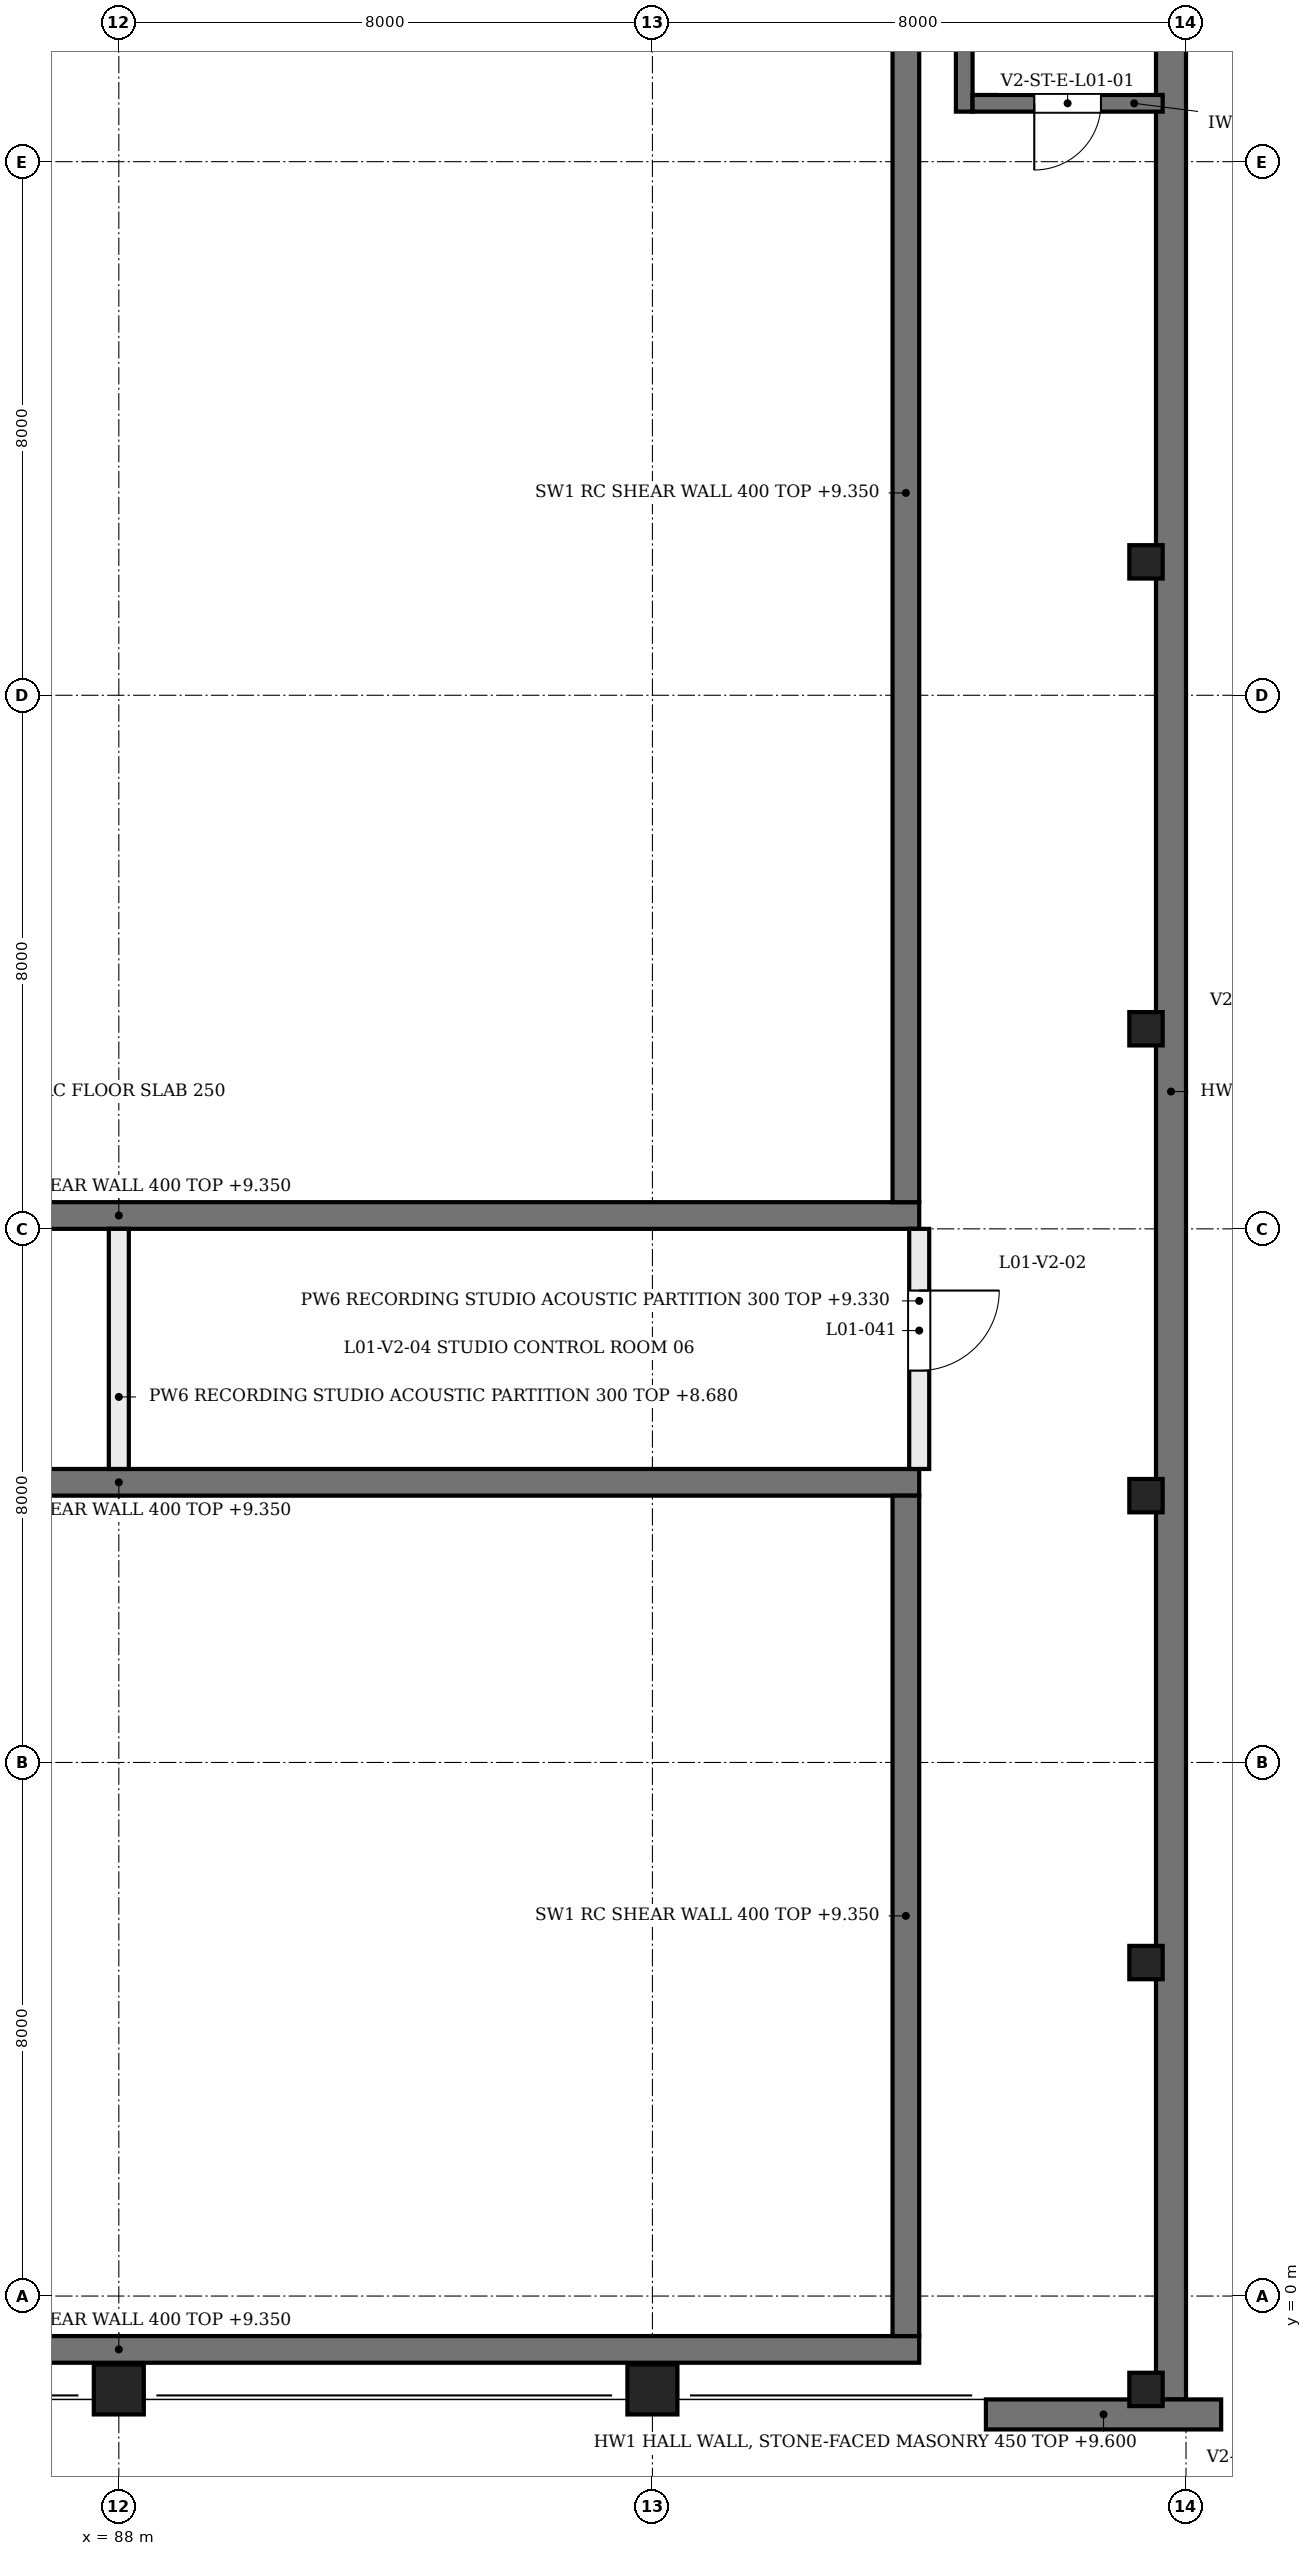
"""IFC4 building model, lengths in metres.
Left out: names, types, materials, properties, quantities, classifications, styles, units other than length and angle.
Written with IfcOpenShell. Run it as: python <this file> out.ifc"""

import sys

from ifc_helpers import new_model, si_unit, direction, frame, frame_2d, origin, origin_2d, place, context, subcontext, project, spatial, rectangle, hollow_rectangle, extrude, element, fill, save


model = new_model("IFC4")
c1 = context("Model", 3, precision=1e-05, world=origin(), true_north=direction((0.0, 1.0)))
c2 = subcontext(c1, "Body", "Model", "MODEL_VIEW")
j1 = project(units=[si_unit("LENGTHUNIT", "METRE"), si_unit("PLANEANGLEUNIT", "RADIAN")], contexts=[c1])
p1 = place(None, origin())
s1 = spatial("IfcSite", under=j1, at=p1, CompositionType="ELEMENT")
p2 = place(p1, origin())
s2 = spatial("IfcBuilding", under=s1, at=p2, CompositionType="ELEMENT")
p3 = place(p2, frame((0.0, 0.0, 4.8)))
s3 = spatial("IfcBuildingStorey", under=s2, at=p3, CompositionType="ELEMENT", Elevation=4.8)
p4 = place(p3, frame((76.0, 16.2, 0.0), z_axis=(0.0, 0.0, 1.0), x_axis=(1.0, 0.0, 0.0)))
e1 = element("IfcWall", 1, at=p4, inside=s3, PredefinedType="SHEAR", context=c2, shape_type="SweptSolid", body=[
    extrude(rectangle(XDim=24.0, YDim=0.4, at=frame_2d((12.0, 0.0))), origin(), (0.0, 0.0, 1.0), 4.55),
])
p5 = place(p3, frame((99.8, 16.4, 0.0), z_axis=(0.0, 0.0, 1.0), x_axis=(0.0, 1.0, 0.0)))
e2 = element("IfcWall", 2, at=p5, inside=s3, PredefinedType="SHEAR", context=c2, shape_type="SweptSolid", body=[
    extrude(rectangle(XDim=22.6, YDim=0.4, at=frame_2d((11.3, 0.0))), origin(), (0.0, 0.0, 1.0), 4.55),
])
for number, where, z_axis, x_axis in (
    (3, (76.0, -0.8, 0.0), (0.0, 0.0, 1.0), (1.0, 0.0, 0.0)),
    (4, (76.0, 12.2, 0.0), (0.0, 0.0, 1.0), (1.0, 0.0, 0.0)),
):
    element("IfcWall", number, at=place(p3, frame(where, z_axis=z_axis, x_axis=x_axis)), inside=s3, PredefinedType="SHEAR", context=c2, shape_type="SweptSolid", body=[
        extrude(rectangle(XDim=24.0, YDim=0.4, at=frame_2d((12.0, 0.0))), origin(), (0.0, 0.0, 1.0), 4.55),
    ])
p6 = place(p3, frame((99.8, -0.6, 0.0), z_axis=(0.0, 0.0, 1.0), x_axis=(0.0, 1.0, 0.0)))
e5 = element("IfcWall", 5, at=p6, inside=s3, PredefinedType="SHEAR", context=c2, shape_type="SweptSolid", body=[
    extrude(rectangle(XDim=12.6, YDim=0.4, at=frame_2d((6.3, 0.0))), origin(), (0.0, 0.0, 1.0), 4.55),
])
for number, where, z_axis, x_axis in (
    (6, (88.0, -1.4, 0.0), (0.0, 0.0, 1.0), (1.0, 0.0, 0.0)),
    (7, (96.0, -1.4, 0.0), (0.0, 0.0, 1.0), (1.0, 0.0, 0.0)),
):
    element("IfcColumn", number, at=place(p3, frame(where, z_axis=z_axis, x_axis=x_axis)), inside=s3, PredefinedType="COLUMN", context=c2, shape_type="SweptSolid", body=[
        extrude(rectangle(XDim=0.75, YDim=0.75, at=origin_2d()), origin(), (0.0, 0.0, 1.0), 4.8),
    ])
for number, where, z_axis, x_axis in (
    (8, (103.4, -1.4, 0.0), (0.0, 0.0, 1.0), (1.0, 0.0, 0.0)),
    (9, (103.4, 5.0, 0.0), (0.0, 0.0, 1.0), (1.0, 0.0, 0.0)),
    (10, (103.4, 12.0, 0.0), (0.0, 0.0, 1.0), (1.0, 0.0, 0.0)),
    (11, (103.4, 19.0, 0.0), (0.0, 0.0, 1.0), (1.0, 0.0, 0.0)),
    (12, (103.4, 26.0, 0.0), (0.0, 0.0, 1.0), (1.0, 0.0, 0.0)),
):
    element("IfcColumn", number, at=place(p3, frame(where, z_axis=z_axis, x_axis=x_axis)), inside=s3, PredefinedType="COLUMN", context=c2, shape_type="SweptSolid", body=[
        extrude(rectangle(XDim=0.5, YDim=0.5, at=origin_2d()), origin(), (0.0, 0.0, 1.0), 4.8),
    ])
p7 = place(p3, frame((105.213, -2.0, 0.0), z_axis=(-0.100951540179, 0.0, 0.994891344085), x_axis=(0.0, -1.0, 0.0)))
e13 = element("IfcColumn", 13, at=p7, inside=s3, PredefinedType="COLUMN", context=c2, shape_type="SweptSolid", body=[
    extrude(hollow_rectangle(XDim=0.4, YDim=0.4, WallThickness=0.016, InnerFilletRadius=0.016, OuterFilletRadius=0.024, at=origin_2d()), origin(), (0.0, 0.0, 1.0), 4.825),
])
for number, where, z_axis, x_axis in (
    (14, (105.213, 5.0, 0.0), (-0.101, 0.0, 0.995), (0.0, -1.0, 0.0)),
    (15, (105.213, 12.0, 0.0), (-0.101, 0.0, 0.995), (0.0, -1.0, 0.0)),
    (16, (105.213, 19.0, 0.0), (-0.101, 0.0, 0.995), (0.0, -1.0, 0.0)),
    (17, (105.213, 26.0, 0.0), (-0.101, 0.0, 0.995), (0.0, -1.0, 0.0)),
    (18, (105.213, 33.0, 0.0), (-0.101, 0.0, 0.995), (0.0, -1.0, 0.0)),
):
    element("IfcColumn", number, at=place(p3, frame(where, z_axis=z_axis, x_axis=x_axis)), inside=s3, PredefinedType="COLUMN", context=c2, shape_type="SweptSolid", body=[
        extrude(hollow_rectangle(XDim=0.4, YDim=0.4, WallThickness=0.012, InnerFilletRadius=0.012, OuterFilletRadius=0.019, at=origin_2d()), origin(), (0.0, 0.0, 1.0), 4.825),
    ])
p8 = place(p3, frame((103.775, -1.55, 0.0), z_axis=(0.0, 0.0, 1.0), x_axis=(0.0, 1.0, 0.0)))
e19 = element("IfcWall", 19, at=p8, inside=s3, PredefinedType="SOLIDWALL", context=c2, shape_type="SweptSolid", body=[
    extrude(rectangle(XDim=41.1, YDim=0.45, at=frame_2d((20.55, 0.0))), origin(), (0.0, 0.0, 1.0), 4.8),
])
p9 = place(p3, frame((101.0, -1.775, 0.0), z_axis=(0.0, 0.0, 1.0), x_axis=(1.0, 0.0, 0.0)))
e20 = element("IfcWall", 20, at=p9, inside=s3, PredefinedType="SOLIDWALL", context=c2, shape_type="SweptSolid", body=[
    extrude(rectangle(XDim=3.527, YDim=0.45, at=frame_2d((1.764, 0.0))), origin(), (0.0, 0.0, 1.0), 4.8),
])
p10 = place(p3, frame((100.675, 32.75, 0.0), z_axis=(0.0, 0.0, 1.0), x_axis=(0.0, 1.0, 0.0)))
e21 = element("IfcWall", 21, at=p10, inside=s3, PredefinedType="SOLIDWALL", context=c2, shape_type="SweptSolid", body=[
    extrude(rectangle(XDim=6.8, YDim=0.25, at=frame_2d((3.4, 0.0))), origin(), (0.0, 0.0, 1.0), 4.8),
])
p11 = place(p3, frame((100.8, 32.875, 0.0), z_axis=(0.0, 0.0, 1.0), x_axis=(1.0, 0.0, 0.0)))
e22 = element("IfcWall", 22, at=p11, inside=s3, PredefinedType="SOLIDWALL", context=c2, shape_type="SweptSolid", body=[
    extrude(rectangle(XDim=2.85, YDim=0.25, at=frame_2d((1.425, 0.0))), origin(), (0.0, 0.0, 1.0), 4.8),
])
p12 = place(p11, frame((0.925, 0.0, 0.0)))
e23 = element("IfcOpeningElement", 23, at=p12, cuts=e22, PredefinedType="OPENING", context=c2, shape_type="SweptSolid", body=[
    extrude(rectangle(XDim=1.0, YDim=2.1, at=frame_2d((0.5, 1.05))), frame((0.0, 0.135, 0.0), z_axis=(0.0, -1.0, 0.0), x_axis=(1.0, 0.0, 0.0)), (0.0, 0.0, 1.0), 0.27),
])
p13 = place(p3, frame((100.0, 12.4, 0.0), z_axis=(0.0, 0.0, 1.0), x_axis=(0.0, 1.0, 0.0)))
e24 = element("IfcWall", 24, at=p13, inside=s3, PredefinedType="PARTITIONING", context=c2, shape_type="SweptSolid", body=[
    extrude(rectangle(XDim=3.6, YDim=0.3, at=frame_2d((1.8, 0.0))), origin(), (0.0, 0.0, 1.0), 4.53),
])
p14 = place(p13, frame((1.475, 0.0, 0.0)))
e25 = element("IfcOpeningElement", 25, at=p14, cuts=e24, PredefinedType="OPENING", context=c2, shape_type="SweptSolid", body=[
    extrude(rectangle(XDim=1.2, YDim=2.2, at=frame_2d((0.6, 1.1))), frame((0.0, 0.16, 0.0), z_axis=(0.0, -1.0, 0.0), x_axis=(1.0, 0.0, 0.0)), (0.0, 0.0, 1.0), 0.32),
])
p15 = place(p3, frame((88.0, 12.4, 0.0), z_axis=(0.0, 0.0, 1.0), x_axis=(0.0, 1.0, 0.0)))
e26 = element("IfcWall", 26, at=p15, inside=s3, PredefinedType="PARTITIONING", context=c2, shape_type="SweptSolid", body=[
    extrude(rectangle(XDim=3.6, YDim=0.3, at=frame_2d((1.8, 0.0))), origin(), (0.0, 0.0, 1.0), 3.88),
])
p16 = place(p12, frame((1.0, 0.0, 0.0), z_axis=(0.0, 0.0, 1.0), x_axis=(-1.0, 0.0, 0.0)))
e27 = element("IfcDoor", 27, at=p16, inside=s3, OperationType="SINGLE_SWING_LEFT", PredefinedType="DOOR", context=c2, shape_type="SweptSolid", body=[
    extrude(rectangle(XDim=1.0, YDim=2.1, at=frame_2d((0.5, 1.05))), frame((0.0, 0.025, 0.0), z_axis=(0.0, -1.0, 0.0), x_axis=(1.0, 0.0, 0.0)), (0.0, 0.0, 1.0), 0.05),
])
fill(e23, e27)
p17 = place(p14, origin())
e28 = element("IfcDoor", 28, at=p17, inside=s3, OperationType="SINGLE_SWING_RIGHT", PredefinedType="DOOR", context=c2, shape_type="SweptSolid", body=[
    extrude(rectangle(XDim=1.2, YDim=2.2, at=frame_2d((0.6, 1.1))), frame((0.0, 0.025, 0.0), z_axis=(0.0, -1.0, 0.0), x_axis=(1.0, 0.0, 0.0)), (0.0, 0.0, 1.0), 0.05),
])
fill(e25, e28)
save(model, sys.argv[1])
